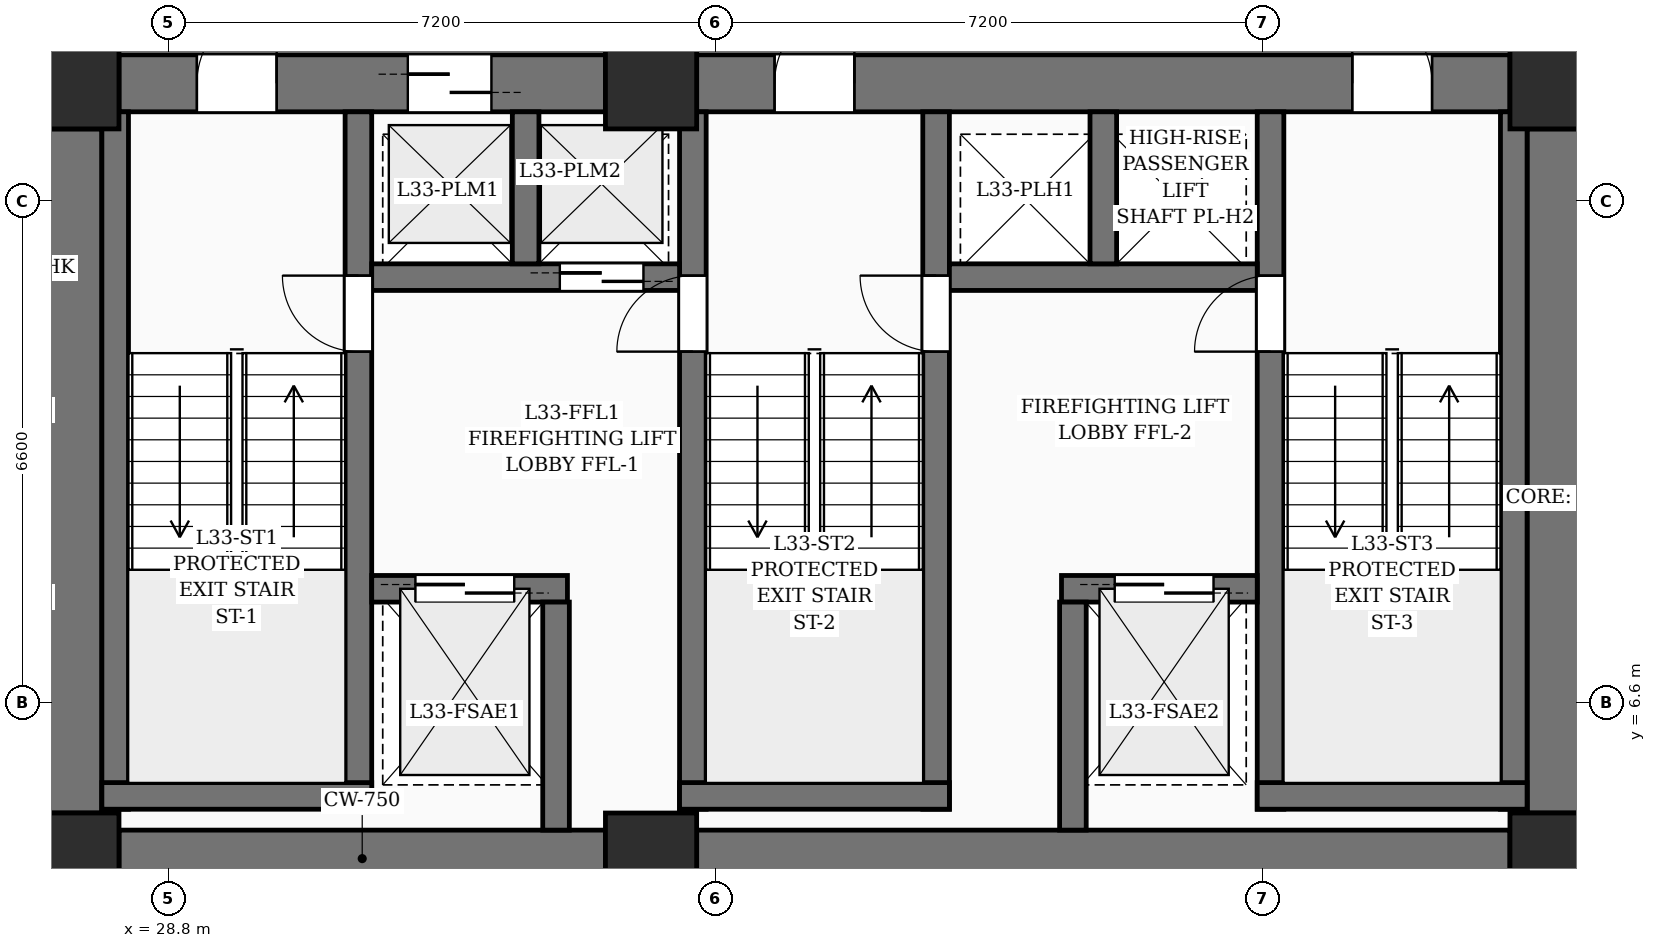
"""IFC4 building model, lengths in metres.
Left out: names, types, materials, properties, quantities, classifications, styles, units other than length and angle.
Written with IfcOpenShell. Run it as: python <this file> out.ifc"""

import sys

from ifc_helpers import new_model, si_unit, direction, frame, frame_2d, origin, origin_2d, place, context, subcontext, project, spatial, rectangle, extrude, element, fill, save


model = new_model("IFC4")
c1 = context("Model", 3, precision=1e-05, world=origin(), true_north=direction((0.0, 1.0)))
c2 = subcontext(c1, "Body", "Model", "MODEL_VIEW")
j1 = project(units=[si_unit("LENGTHUNIT", "METRE"), si_unit("PLANEANGLEUNIT", "RADIAN")], contexts=[c1])
p1 = place(None, origin())
s1 = spatial("IfcSite", under=j1, at=p1, CompositionType="ELEMENT")
p2 = place(p1, origin())
s2 = spatial("IfcBuilding", under=s1, at=p2, CompositionType="ELEMENT")
p3 = place(p2, frame((0.0, 0.0, 132.0)))
s3 = spatial("IfcBuildingStorey", under=s2, at=p3, CompositionType="ELEMENT", Elevation=132.0)
for number, where, z_axis, x_axis in (
    (1, (27.55, 4.55, 0.0), (0.0, 0.0, 1.0), (1.0, 0.0, 0.0)),
    (2, (35.15, 4.55, 0.0), (0.0, 0.0, 1.0), (1.0, 0.0, 0.0)),
    (3, (47.05, 4.55, 0.0), (0.0, 0.0, 1.0), (1.0, 0.0, 0.0)),
    (4, (27.55, 14.75, 0.0), (0.0, 0.0, 1.0), (1.0, 0.0, 0.0)),
    (5, (35.15, 14.75, 0.0), (0.0, 0.0, 1.0), (1.0, 0.0, 0.0)),
    (6, (47.05, 14.75, 0.0), (0.0, 0.0, 1.0), (1.0, 0.0, 0.0)),
):
    element("IfcColumn", number, at=place(p3, frame(where, z_axis=z_axis, x_axis=x_axis)), inside=s3, PredefinedType="COLUMN", context=c2, shape_type="SweptSolid", body=[
        extrude(rectangle(XDim=1.2, YDim=1.2, at=origin_2d()), origin(), (0.0, 0.0, 1.0), 3.6),
    ])
p4 = place(p3, frame((28.15, 4.55, 0.0), z_axis=(0.0, 0.0, 1.0), x_axis=(1.0, 0.0, 0.0)))
e7 = element("IfcWall", 7, at=p4, inside=s3, PredefinedType="SHEAR", context=c2, shape_type="SweptSolid", body=[
    extrude(rectangle(XDim=6.4, YDim=0.75, at=frame_2d((3.2, 0.0))), origin(), (0.0, 0.0, 1.0), 3.6),
])
p5 = place(p3, frame((35.75, 4.55, 0.0), z_axis=(0.0, 0.0, 1.0), x_axis=(1.0, 0.0, 0.0)))
e8 = element("IfcWall", 8, at=p5, inside=s3, PredefinedType="SHEAR", context=c2, shape_type="SweptSolid", body=[
    extrude(rectangle(XDim=10.7, YDim=0.75, at=frame_2d((5.35, 0.0))), origin(), (0.0, 0.0, 1.0), 3.6),
])
p6 = place(p3, frame((28.15, 14.75, 0.0), z_axis=(0.0, 0.0, 1.0), x_axis=(1.0, 0.0, 0.0)))
e9 = element("IfcWall", 9, at=p6, inside=s3, PredefinedType="SHEAR", context=c2, shape_type="SweptSolid", body=[
    extrude(rectangle(XDim=6.4, YDim=0.75, at=frame_2d((3.2, 0.0))), origin(), (0.0, 0.0, 1.0), 3.6),
])
p7 = place(p6, frame((1.025, 0.0, 0.0)))
e10 = element("IfcOpeningElement", 10, at=p7, cuts=e9, PredefinedType="OPENING", context=c2, shape_type="SweptSolid", body=[
    extrude(rectangle(XDim=1.05, YDim=2.15, at=frame_2d((0.525, 1.075))), frame((0.0, 0.385, 0.0), z_axis=(0.0, -1.0, 0.0), x_axis=(1.0, 0.0, 0.0)), (0.0, 0.0, 1.0), 0.77),
])
p8 = place(p6, frame((3.8, 0.0, 0.0)))
e11 = element("IfcOpeningElement", 11, at=p8, cuts=e9, PredefinedType="OPENING", context=c2, shape_type="SweptSolid", body=[
    extrude(rectangle(XDim=1.1, YDim=2.2, at=frame_2d((0.55, 1.1))), frame((0.0, 0.385, 0.0), z_axis=(0.0, -1.0, 0.0), x_axis=(1.0, 0.0, 0.0)), (0.0, 0.0, 1.0), 0.77),
])
p9 = place(p3, frame((35.75, 14.75, 0.0), z_axis=(0.0, 0.0, 1.0), x_axis=(1.0, 0.0, 0.0)))
e12 = element("IfcWall", 12, at=p9, inside=s3, PredefinedType="SHEAR", context=c2, shape_type="SweptSolid", body=[
    extrude(rectangle(XDim=10.7, YDim=0.75, at=frame_2d((5.35, 0.0))), origin(), (0.0, 0.0, 1.0), 3.6),
])
p10 = place(p9, frame((1.025, 0.0, 0.0)))
e13 = element("IfcOpeningElement", 13, at=p10, cuts=e12, PredefinedType="OPENING", context=c2, shape_type="SweptSolid", body=[
    extrude(rectangle(XDim=1.05, YDim=2.15, at=frame_2d((0.525, 1.075))), frame((0.0, 0.385, 0.0), z_axis=(0.0, -1.0, 0.0), x_axis=(1.0, 0.0, 0.0)), (0.0, 0.0, 1.0), 0.77),
])
p11 = place(p9, frame((8.625, 0.0, 0.0)))
e14 = element("IfcOpeningElement", 14, at=p11, cuts=e12, PredefinedType="OPENING", context=c2, shape_type="SweptSolid", body=[
    extrude(rectangle(XDim=1.05, YDim=2.15, at=frame_2d((0.525, 1.075))), frame((0.0, 0.385, 0.0), z_axis=(0.0, -1.0, 0.0), x_axis=(1.0, 0.0, 0.0)), (0.0, 0.0, 1.0), 0.77),
])
for number, where, z_axis, x_axis in (
    (15, (27.55, 5.15, 0.0), (0.0, 0.0, 1.0), (0.0, 1.0, 0.0)),
    (16, (47.05, 5.15, 0.0), (0.0, 0.0, 1.0), (0.0, 1.0, 0.0)),
):
    element("IfcWall", number, at=place(p3, frame(where, z_axis=z_axis, x_axis=x_axis)), inside=s3, PredefinedType="SHEAR", context=c2, shape_type="SweptSolid", body=[
        extrude(rectangle(XDim=9.0, YDim=0.75, at=frame_2d((4.5, 0.0))), origin(), (0.0, 0.0, 1.0), 3.6),
    ])
p12 = place(p3, frame((28.1, 5.2, 0.0), z_axis=(0.0, 0.0, 1.0), x_axis=(0.0, 1.0, 0.0)))
e17 = element("IfcWall", 17, at=p12, inside=s3, PredefinedType="SOLIDWALL", context=c2, shape_type="SweptSolid", body=[
    extrude(rectangle(XDim=9.175, YDim=0.35, at=frame_2d((4.587, 0.0))), origin(), (0.0, 0.0, 1.0), 3.6),
])
p13 = place(p3, frame((31.3, 5.2, 0.0), z_axis=(0.0, 0.0, 1.0), x_axis=(0.0, 1.0, 0.0)))
e18 = element("IfcWall", 18, at=p13, inside=s3, PredefinedType="SOLIDWALL", context=c2, shape_type="SweptSolid", body=[
    extrude(rectangle(XDim=9.175, YDim=0.35, at=frame_2d((4.587, 0.0))), origin(), (0.0, 0.0, 1.0), 3.6),
])
p14 = place(p13, frame((6.02, 0.0, 0.0)))
e19 = element("IfcOpeningElement", 19, at=p14, cuts=e18, PredefinedType="OPENING", context=c2, shape_type="SweptSolid", body=[
    extrude(rectangle(XDim=1.0, YDim=2.15, at=frame_2d((0.5, 1.075))), frame((0.0, 0.185, 0.0), z_axis=(0.0, -1.0, 0.0), x_axis=(1.0, 0.0, 0.0)), (0.0, 0.0, 1.0), 0.37),
])
p15 = place(p3, frame((27.925, 5.375, 0.0), z_axis=(0.0, 0.0, 1.0), x_axis=(1.0, 0.0, 0.0)))
e20 = element("IfcWall", 20, at=p15, inside=s3, PredefinedType="SOLIDWALL", context=c2, shape_type="SweptSolid", body=[
    extrude(rectangle(XDim=3.55, YDim=0.35, at=frame_2d((1.775, 0.0))), origin(), (0.0, 0.0, 1.0), 3.6),
])
p16 = place(p3, frame((35.7, 5.2, 0.0), z_axis=(0.0, 0.0, 1.0), x_axis=(0.0, 1.0, 0.0)))
e21 = element("IfcWall", 21, at=p16, inside=s3, PredefinedType="SOLIDWALL", context=c2, shape_type="SweptSolid", body=[
    extrude(rectangle(XDim=9.175, YDim=0.35, at=frame_2d((4.587, 0.0))), origin(), (0.0, 0.0, 1.0), 3.6),
])
p17 = place(p16, frame((6.02, 0.0, 0.0)))
e22 = element("IfcOpeningElement", 22, at=p17, cuts=e21, PredefinedType="OPENING", context=c2, shape_type="SweptSolid", body=[
    extrude(rectangle(XDim=1.0, YDim=2.15, at=frame_2d((0.5, 1.075))), frame((0.0, 0.185, 0.0), z_axis=(0.0, -1.0, 0.0), x_axis=(1.0, 0.0, 0.0)), (0.0, 0.0, 1.0), 0.37),
])
p18 = place(p3, frame((38.9, 5.2, 0.0), z_axis=(0.0, 0.0, 1.0), x_axis=(0.0, 1.0, 0.0)))
e23 = element("IfcWall", 23, at=p18, inside=s3, PredefinedType="SOLIDWALL", context=c2, shape_type="SweptSolid", body=[
    extrude(rectangle(XDim=9.175, YDim=0.35, at=frame_2d((4.587, 0.0))), origin(), (0.0, 0.0, 1.0), 3.6),
])
p19 = place(p18, frame((6.02, 0.0, 0.0)))
e24 = element("IfcOpeningElement", 24, at=p19, cuts=e23, PredefinedType="OPENING", context=c2, shape_type="SweptSolid", body=[
    extrude(rectangle(XDim=1.0, YDim=2.15, at=frame_2d((0.5, 1.075))), frame((0.0, 0.185, 0.0), z_axis=(0.0, -1.0, 0.0), x_axis=(1.0, 0.0, 0.0)), (0.0, 0.0, 1.0), 0.37),
])
p20 = place(p3, frame((35.525, 5.375, 0.0), z_axis=(0.0, 0.0, 1.0), x_axis=(1.0, 0.0, 0.0)))
e25 = element("IfcWall", 25, at=p20, inside=s3, PredefinedType="SOLIDWALL", context=c2, shape_type="SweptSolid", body=[
    extrude(rectangle(XDim=3.55, YDim=0.35, at=frame_2d((1.775, 0.0))), origin(), (0.0, 0.0, 1.0), 3.6),
])
p21 = place(p3, frame((43.3, 5.2, 0.0), z_axis=(0.0, 0.0, 1.0), x_axis=(0.0, 1.0, 0.0)))
e26 = element("IfcWall", 26, at=p21, inside=s3, PredefinedType="SOLIDWALL", context=c2, shape_type="SweptSolid", body=[
    extrude(rectangle(XDim=9.175, YDim=0.35, at=frame_2d((4.587, 0.0))), origin(), (0.0, 0.0, 1.0), 3.6),
])
p22 = place(p21, frame((6.02, 0.0, 0.0)))
e27 = element("IfcOpeningElement", 27, at=p22, cuts=e26, PredefinedType="OPENING", context=c2, shape_type="SweptSolid", body=[
    extrude(rectangle(XDim=1.0, YDim=2.15, at=frame_2d((0.5, 1.075))), frame((0.0, 0.185, 0.0), z_axis=(0.0, -1.0, 0.0), x_axis=(1.0, 0.0, 0.0)), (0.0, 0.0, 1.0), 0.37),
])
p23 = place(p3, frame((46.5, 5.2, 0.0), z_axis=(0.0, 0.0, 1.0), x_axis=(0.0, 1.0, 0.0)))
e28 = element("IfcWall", 28, at=p23, inside=s3, PredefinedType="SOLIDWALL", context=c2, shape_type="SweptSolid", body=[
    extrude(rectangle(XDim=9.175, YDim=0.35, at=frame_2d((4.587, 0.0))), origin(), (0.0, 0.0, 1.0), 3.6),
])
p24 = place(p3, frame((43.125, 5.375, 0.0), z_axis=(0.0, 0.0, 1.0), x_axis=(1.0, 0.0, 0.0)))
e29 = element("IfcWall", 29, at=p24, inside=s3, PredefinedType="SOLIDWALL", context=c2, shape_type="SweptSolid", body=[
    extrude(rectangle(XDim=3.55, YDim=0.35, at=frame_2d((1.775, 0.0))), origin(), (0.0, 0.0, 1.0), 3.6),
])
p25 = place(p3, frame((31.475, 8.1, 0.0), z_axis=(0.0, 0.0, 1.0), x_axis=(1.0, 0.0, 0.0)))
e30 = element("IfcWall", 30, at=p25, inside=s3, PredefinedType="SOLIDWALL", context=c2, shape_type="SweptSolid", body=[
    extrude(rectangle(XDim=2.575, YDim=0.35, at=frame_2d((1.288, 0.0))), origin(), (0.0, 0.0, 1.0), 3.6),
])
p26 = place(p25, frame((0.575, 0.0, 0.0)))
e31 = element("IfcOpeningElement", 31, at=p26, cuts=e30, PredefinedType="OPENING", context=c2, shape_type="SweptSolid", body=[
    extrude(rectangle(XDim=1.3, YDim=2.25, at=frame_2d((0.65, 1.125))), frame((0.0, 0.185, 0.0), z_axis=(0.0, -1.0, 0.0), x_axis=(1.0, 0.0, 0.0)), (0.0, 0.0, 1.0), 0.37),
])
p27 = place(p3, frame((40.55, 8.1, 0.0), z_axis=(0.0, 0.0, 1.0), x_axis=(1.0, 0.0, 0.0)))
e32 = element("IfcWall", 32, at=p27, inside=s3, PredefinedType="SOLIDWALL", context=c2, shape_type="SweptSolid", body=[
    extrude(rectangle(XDim=2.575, YDim=0.35, at=frame_2d((1.288, 0.0))), origin(), (0.0, 0.0, 1.0), 3.6),
])
p28 = place(p27, frame((0.7, 0.0, 0.0)))
e33 = element("IfcOpeningElement", 33, at=p28, cuts=e32, PredefinedType="OPENING", context=c2, shape_type="SweptSolid", body=[
    extrude(rectangle(XDim=1.3, YDim=2.25, at=frame_2d((0.65, 1.125))), frame((0.0, 0.185, 0.0), z_axis=(0.0, -1.0, 0.0), x_axis=(1.0, 0.0, 0.0)), (0.0, 0.0, 1.0), 0.37),
])
for number, where, z_axis, x_axis in (
    (34, (33.9, 4.925, 0.0), (0.0, 0.0, 1.0), (0.0, 1.0, 0.0)),
    (35, (40.7, 4.925, 0.0), (0.0, 0.0, 1.0), (0.0, 1.0, 0.0)),
):
    element("IfcWall", number, at=place(p3, frame(where, z_axis=z_axis, x_axis=x_axis)), inside=s3, PredefinedType="SOLIDWALL", context=c2, shape_type="SweptSolid", body=[
        extrude(rectangle(XDim=3.0, YDim=0.35, at=frame_2d((1.5, 0.0))), origin(), (0.0, 0.0, 1.0), 3.6),
    ])
p29 = place(p3, frame((31.475, 12.2, 0.0), z_axis=(0.0, 0.0, 1.0), x_axis=(1.0, 0.0, 0.0)))
e36 = element("IfcWall", 36, at=p29, inside=s3, PredefinedType="SOLIDWALL", context=c2, shape_type="SweptSolid", body=[
    extrude(rectangle(XDim=4.05, YDim=0.35, at=frame_2d((2.025, 0.0))), origin(), (0.0, 0.0, 1.0), 3.6),
])
p30 = place(p29, frame((2.475, 0.0, 0.0)))
e37 = element("IfcOpeningElement", 37, at=p30, cuts=e36, PredefinedType="OPENING", context=c2, shape_type="SweptSolid", body=[
    extrude(rectangle(XDim=1.1, YDim=2.2, at=frame_2d((0.55, 1.1))), frame((0.0, 0.185, 0.0), z_axis=(0.0, -1.0, 0.0), x_axis=(1.0, 0.0, 0.0)), (0.0, 0.0, 1.0), 0.37),
])
p31 = place(p3, frame((33.5, 12.375, 0.0), z_axis=(0.0, 0.0, 1.0), x_axis=(0.0, 1.0, 0.0)))
e38 = element("IfcWall", 38, at=p31, inside=s3, PredefinedType="SOLIDWALL", context=c2, shape_type="SweptSolid", body=[
    extrude(rectangle(XDim=2.0, YDim=0.35, at=frame_2d((1.0, 0.0))), origin(), (0.0, 0.0, 1.0), 3.6),
])
p32 = place(p3, frame((39.075, 12.2, 0.0), z_axis=(0.0, 0.0, 1.0), x_axis=(1.0, 0.0, 0.0)))
e39 = element("IfcWall", 39, at=p32, inside=s3, PredefinedType="SOLIDWALL", context=c2, shape_type="SweptSolid", body=[
    extrude(rectangle(XDim=4.05, YDim=0.35, at=frame_2d((2.025, 0.0))), origin(), (0.0, 0.0, 1.0), 3.6),
])
p33 = place(p3, frame((41.1, 12.375, 0.0), z_axis=(0.0, 0.0, 1.0), x_axis=(0.0, 1.0, 0.0)))
e40 = element("IfcWall", 40, at=p33, inside=s3, PredefinedType="SOLIDWALL", context=c2, shape_type="SweptSolid", body=[
    extrude(rectangle(XDim=2.0, YDim=0.35, at=frame_2d((1.0, 0.0))), origin(), (0.0, 0.0, 1.0), 3.6),
])
p34 = place(p7, origin())
e41 = element("IfcDoor", 41, at=p34, inside=s3, OperationType="SINGLE_SWING_RIGHT", PredefinedType="DOOR", context=c2, shape_type="SweptSolid", body=[
    extrude(rectangle(XDim=1.05, YDim=2.15, at=frame_2d((0.525, 1.075))), frame((0.0, 0.025, 0.0), z_axis=(0.0, -1.0, 0.0), x_axis=(1.0, 0.0, 0.0)), (0.0, 0.0, 1.0), 0.05),
])
fill(e10, e41)
p35 = place(p10, origin())
e42 = element("IfcDoor", 42, at=p35, inside=s3, OperationType="SINGLE_SWING_RIGHT", PredefinedType="DOOR", context=c2, shape_type="SweptSolid", body=[
    extrude(rectangle(XDim=1.05, YDim=2.15, at=frame_2d((0.525, 1.075))), frame((0.0, 0.025, 0.0), z_axis=(0.0, -1.0, 0.0), x_axis=(1.0, 0.0, 0.0)), (0.0, 0.0, 1.0), 0.05),
])
fill(e13, e42)
p36 = place(p11, origin())
e43 = element("IfcDoor", 43, at=p36, inside=s3, OperationType="SINGLE_SWING_LEFT", PredefinedType="DOOR", context=c2, shape_type="SweptSolid", body=[
    extrude(rectangle(XDim=1.05, YDim=2.15, at=frame_2d((0.525, 1.075))), frame((0.0, 0.025, 0.0), z_axis=(0.0, -1.0, 0.0), x_axis=(1.0, 0.0, 0.0)), (0.0, 0.0, 1.0), 0.05),
])
fill(e14, e43)
p37 = place(p14, origin())
e44 = element("IfcDoor", 44, at=p37, inside=s3, OperationType="SINGLE_SWING_RIGHT", PredefinedType="DOOR", context=c2, shape_type="SweptSolid", body=[
    extrude(rectangle(XDim=1.0, YDim=2.15, at=frame_2d((0.5, 1.075))), frame((0.0, 0.025, 0.0), z_axis=(0.0, -1.0, 0.0), x_axis=(1.0, 0.0, 0.0)), (0.0, 0.0, 1.0), 0.05),
])
fill(e19, e44)
p38 = place(p17, origin())
e45 = element("IfcDoor", 45, at=p38, inside=s3, OperationType="SINGLE_SWING_LEFT", PredefinedType="DOOR", context=c2, shape_type="SweptSolid", body=[
    extrude(rectangle(XDim=1.0, YDim=2.15, at=frame_2d((0.5, 1.075))), frame((0.0, 0.025, 0.0), z_axis=(0.0, -1.0, 0.0), x_axis=(1.0, 0.0, 0.0)), (0.0, 0.0, 1.0), 0.05),
])
fill(e22, e45)
p39 = place(p19, origin())
e46 = element("IfcDoor", 46, at=p39, inside=s3, OperationType="SINGLE_SWING_RIGHT", PredefinedType="DOOR", context=c2, shape_type="SweptSolid", body=[
    extrude(rectangle(XDim=1.0, YDim=2.15, at=frame_2d((0.5, 1.075))), frame((0.0, 0.025, 0.0), z_axis=(0.0, -1.0, 0.0), x_axis=(1.0, 0.0, 0.0)), (0.0, 0.0, 1.0), 0.05),
])
fill(e24, e46)
p40 = place(p22, origin())
e47 = element("IfcDoor", 47, at=p40, inside=s3, OperationType="SINGLE_SWING_LEFT", PredefinedType="DOOR", context=c2, shape_type="SweptSolid", body=[
    extrude(rectangle(XDim=1.0, YDim=2.15, at=frame_2d((0.5, 1.075))), frame((0.0, 0.025, 0.0), z_axis=(0.0, -1.0, 0.0), x_axis=(1.0, 0.0, 0.0)), (0.0, 0.0, 1.0), 0.05),
])
fill(e27, e47)
p41 = place(p26, origin())
e48 = element("IfcDoor", 48, at=p41, inside=s3, OperationType="DOUBLE_DOOR_SLIDING", PredefinedType="DOOR", context=c2, shape_type="SweptSolid", body=[
    extrude(rectangle(XDim=1.3, YDim=2.25, at=frame_2d((0.65, 1.125))), frame((0.0, 0.025, 0.0), z_axis=(0.0, -1.0, 0.0), x_axis=(1.0, 0.0, 0.0)), (0.0, 0.0, 1.0), 0.05),
])
fill(e31, e48)
p42 = place(p28, origin())
e49 = element("IfcDoor", 49, at=p42, inside=s3, OperationType="DOUBLE_DOOR_SLIDING", PredefinedType="DOOR", context=c2, shape_type="SweptSolid", body=[
    extrude(rectangle(XDim=1.3, YDim=2.25, at=frame_2d((0.65, 1.125))), frame((0.0, 0.025, 0.0), z_axis=(0.0, -1.0, 0.0), x_axis=(1.0, 0.0, 0.0)), (0.0, 0.0, 1.0), 0.05),
])
fill(e33, e49)
p43 = place(p8, origin())
e50 = element("IfcDoor", 50, at=p43, inside=s3, OperationType="DOUBLE_DOOR_SLIDING", PredefinedType="DOOR", context=c2, shape_type="SweptSolid", body=[
    extrude(rectangle(XDim=1.1, YDim=2.2, at=frame_2d((0.55, 1.1))), frame((0.0, 0.025, 0.0), z_axis=(0.0, -1.0, 0.0), x_axis=(1.0, 0.0, 0.0)), (0.0, 0.0, 1.0), 0.05),
])
fill(e11, e50)
p44 = place(p30, origin())
e51 = element("IfcDoor", 51, at=p44, inside=s3, OperationType="DOUBLE_DOOR_SLIDING", PredefinedType="DOOR", context=c2, shape_type="SweptSolid", body=[
    extrude(rectangle(XDim=1.1, YDim=2.2, at=frame_2d((0.55, 1.1))), frame((0.0, 0.025, 0.0), z_axis=(0.0, -1.0, 0.0), x_axis=(1.0, 0.0, 0.0)), (0.0, 0.0, 1.0), 0.05),
])
fill(e37, e51)
save(model, sys.argv[1])
